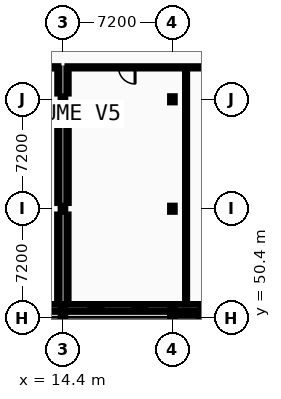
"""IFC4 building model, lengths in metres.
Left out: names, types, materials, properties, quantities, classifications, styles, units other than length and angle.
Written with IfcOpenShell. Run it as: python <this file> out.ifc"""

import sys

from ifc_helpers import new_model, si_unit, direction, frame, frame_2d, origin, origin_2d, place, context, subcontext, project, spatial, rectangle, i_section, extrude, element, fill, save


model = new_model("IFC4")
c1 = context("Model", 3, precision=1e-05, world=origin(), true_north=direction((0.0, 1.0)))
c2 = subcontext(c1, "Body", "Model", "MODEL_VIEW")
j1 = project(units=[si_unit("LENGTHUNIT", "METRE"), si_unit("PLANEANGLEUNIT", "RADIAN")], contexts=[c1])
p1 = place(None, origin())
s1 = spatial("IfcSite", under=j1, at=p1, CompositionType="ELEMENT")
p2 = place(p1, origin())
s2 = spatial("IfcBuilding", under=s1, at=p2, CompositionType="ELEMENT")
p3 = place(p2, origin())
s3 = spatial("IfcBuildingStorey", under=s2, at=p3, CompositionType="ELEMENT", Elevation=0.0)
p4 = place(p3, frame((14.4, 50.4, 0.0), z_axis=(0.0, 0.0, 1.0), x_axis=(1.0, 0.0, 0.0)))
e1 = element("IfcColumn", 1, at=p4, inside=s3, PredefinedType="COLUMN", context=c2, shape_type="SweptSolid", body=[
    extrude(i_section(OverallWidth=0.3, OverallDepth=0.45, WebThickness=0.014, FlangeThickness=0.026, FilletRadius=0.027, at=origin_2d()), origin(), (0.0, 0.0, 1.0), 5.2),
])
p5 = place(p3, frame((14.4, 51.12, 0.0), z_axis=(0.0, 0.0, 1.0), x_axis=(1.0, 0.0, 0.0)))
e2 = element("IfcColumn", 2, at=p5, inside=s3, PredefinedType="COLUMN", context=c2, shape_type="SweptSolid", body=[
    extrude(i_section(OverallWidth=0.3, OverallDepth=0.36, WebThickness=0.012, FlangeThickness=0.022, FilletRadius=0.027, at=origin_2d()), origin(), (0.0, 0.0, 1.0), 5.2),
])
for number, where, z_axis, x_axis in (
    (3, (14.4, 57.6, 0.0), (0.0, 0.0, 1.0), (1.0, 0.0, 0.0)),
    (4, (14.4, 64.8, 0.0), (0.0, 0.0, 1.0), (1.0, 0.0, 0.0)),
):
    element("IfcColumn", number, at=place(p3, frame(where, z_axis=z_axis, x_axis=x_axis)), inside=s3, PredefinedType="COLUMN", context=c2, shape_type="SweptSolid", body=[
        extrude(i_section(OverallWidth=0.3, OverallDepth=0.4, WebThickness=0.013, FlangeThickness=0.024, FilletRadius=0.027, at=origin_2d()), origin(), (0.0, 0.0, 1.0), 5.2),
    ])
p6 = place(p3, frame((21.6, 50.4, 0.0), z_axis=(0.0, 0.0, 1.0), x_axis=(1.0, 0.0, 0.0)))
e5 = element("IfcColumn", 5, at=p6, inside=s3, PredefinedType="COLUMN", context=c2, shape_type="SweptSolid", body=[
    extrude(i_section(OverallWidth=0.3, OverallDepth=0.45, WebThickness=0.014, FlangeThickness=0.026, FilletRadius=0.027, at=origin_2d()), origin(), (0.0, 0.0, 1.0), 5.2),
])
p7 = place(p3, frame((21.6, 51.12, 0.0), z_axis=(0.0, 0.0, 1.0), x_axis=(1.0, 0.0, 0.0)))
e6 = element("IfcColumn", 6, at=p7, inside=s3, PredefinedType="COLUMN", context=c2, shape_type="SweptSolid", body=[
    extrude(i_section(OverallWidth=0.3, OverallDepth=0.36, WebThickness=0.012, FlangeThickness=0.022, FilletRadius=0.027, at=origin_2d()), origin(), (0.0, 0.0, 1.0), 5.2),
])
for number, where, z_axis, x_axis in (
    (7, (21.6, 57.6, 0.0), (0.0, 0.0, 1.0), (1.0, 0.0, 0.0)),
    (8, (21.6, 64.8, 0.0), (0.0, 0.0, 1.0), (1.0, 0.0, 0.0)),
):
    element("IfcColumn", number, at=place(p3, frame(where, z_axis=z_axis, x_axis=x_axis)), inside=s3, PredefinedType="COLUMN", context=c2, shape_type="SweptSolid", body=[
        extrude(i_section(OverallWidth=0.3, OverallDepth=0.4, WebThickness=0.013, FlangeThickness=0.024, FilletRadius=0.027, at=origin_2d()), origin(), (0.0, 0.0, 1.0), 5.2),
    ])
p8 = place(p3, frame((28.8, 50.4, 0.0), z_axis=(0.0, 0.0, 1.0), x_axis=(-1.0, 0.0, 0.0)))
e9 = element("IfcWall", 9, at=p8, inside=s3, PredefinedType="STANDARD", context=c2, shape_type="SweptSolid", body=[
    extrude(rectangle(XDim=7.31, YDim=0.42, at=frame_2d((3.655, 0.0))), origin(), (0.0, 0.0, 1.0), 4.665),
])
p9 = place(p8, frame((1.743, 0.0, 1.1)))
e10 = element("IfcOpeningElement", 10, at=p9, cuts=e9, PredefinedType="OPENING", context=c2, shape_type="SweptSolid", body=[
    extrude(rectangle(XDim=0.9, YDim=1.6, at=frame_2d((0.45, 0.8))), frame((0.0, 0.22, 0.0), z_axis=(0.0, -1.0, 0.0), x_axis=(1.0, 0.0, 0.0)), (0.0, 0.0, 1.0), 0.44),
])
p10 = place(p8, frame((4.667, 0.0, 1.1)))
e11 = element("IfcOpeningElement", 11, at=p10, cuts=e9, PredefinedType="OPENING", context=c2, shape_type="SweptSolid", body=[
    extrude(rectangle(XDim=0.9, YDim=1.6, at=frame_2d((0.45, 0.8))), frame((0.0, 0.22, 0.0), z_axis=(0.0, -1.0, 0.0), x_axis=(1.0, 0.0, 0.0)), (0.0, 0.0, 1.0), 0.44),
])
p11 = place(p3, frame((7.2, 51.12, 0.0), z_axis=(0.0, 0.0, 1.0), x_axis=(1.0, 0.0, 0.0)))
e12 = element("IfcWall", 12, at=p11, inside=s3, PredefinedType="STANDARD", context=c2, shape_type="SweptSolid", body=[
    extrude(rectangle(XDim=7.2, YDim=0.42, at=frame_2d((3.6, 0.0))), origin(), (0.0, 0.0, 1.0), 4.635),
])
p12 = place(p11, frame((4.576, 0.0, 0.95)))
e13 = element("IfcOpeningElement", 13, at=p12, cuts=e12, PredefinedType="OPENING", context=c2, shape_type="SweptSolid", body=[
    extrude(rectangle(XDim=0.928, YDim=1.404, at=frame_2d((0.464, 0.702))), frame((0.0, 0.22, 0.0), z_axis=(0.0, -1.0, 0.0), x_axis=(1.0, 0.0, 0.0)), (0.0, 0.0, 1.0), 0.44),
])
p13 = place(p3, frame((14.4, 51.12, 0.0), z_axis=(0.0, 0.0, 1.0), x_axis=(1.0, 0.0, 0.0)))
e14 = element("IfcWall", 14, at=p13, inside=s3, PredefinedType="STANDARD", context=c2, shape_type="SweptSolid", body=[
    extrude(rectangle(XDim=7.2, YDim=0.42, at=frame_2d((3.6, 0.0))), origin(), (0.0, 0.0, 1.0), 4.635),
])
p14 = place(p13, frame((1.679, 0.0, 0.95)))
e15 = element("IfcOpeningElement", 15, at=p14, cuts=e14, PredefinedType="OPENING", context=c2, shape_type="SweptSolid", body=[
    extrude(rectangle(XDim=0.962, YDim=1.404, at=frame_2d((0.481, 0.702))), frame((0.0, 0.22, 0.0), z_axis=(0.0, -1.0, 0.0), x_axis=(1.0, 0.0, 0.0)), (0.0, 0.0, 1.0), 0.44),
])
p15 = place(p13, frame((4.559, 0.0, 0.95)))
e16 = element("IfcOpeningElement", 16, at=p15, cuts=e14, PredefinedType="OPENING", context=c2, shape_type="SweptSolid", body=[
    extrude(rectangle(XDim=0.962, YDim=1.404, at=frame_2d((0.481, 0.702))), frame((0.0, 0.22, 0.0), z_axis=(0.0, -1.0, 0.0), x_axis=(1.0, 0.0, 0.0)), (0.0, 0.0, 1.0), 0.44),
])
p16 = place(p3, frame((21.6, 51.12, 0.0), z_axis=(0.0, 0.0, 1.0), x_axis=(1.0, 0.0, 0.0)))
e17 = element("IfcWall", 17, at=p16, inside=s3, PredefinedType="STANDARD", context=c2, shape_type="SweptSolid", body=[
    extrude(rectangle(XDim=7.41, YDim=0.42, at=frame_2d((3.705, 0.0))), origin(), (0.0, 0.0, 1.0), 4.635),
])
p17 = place(p16, frame((1.725, 0.0, 0.95)))
e18 = element("IfcOpeningElement", 18, at=p17, cuts=e17, PredefinedType="OPENING", context=c2, shape_type="SweptSolid", body=[
    extrude(rectangle(XDim=0.996, YDim=1.404, at=frame_2d((0.498, 0.702))), frame((0.0, 0.22, 0.0), z_axis=(0.0, -1.0, 0.0), x_axis=(1.0, 0.0, 0.0)), (0.0, 0.0, 1.0), 0.44),
])
p18 = place(p16, frame((4.689, 0.0, 0.95)))
e19 = element("IfcOpeningElement", 19, at=p18, cuts=e17, PredefinedType="OPENING", context=c2, shape_type="SweptSolid", body=[
    extrude(rectangle(XDim=0.996, YDim=1.404, at=frame_2d((0.498, 0.702))), frame((0.0, 0.22, 0.0), z_axis=(0.0, -1.0, 0.0), x_axis=(1.0, 0.0, 0.0)), (0.0, 0.0, 1.0), 0.44),
])
p19 = place(p3, frame((10.65, 66.9, 0.0), z_axis=(0.0, 0.0, 1.0), x_axis=(1.0, 0.0, 0.0)))
e20 = element("IfcWall", 20, at=p19, inside=s3, PredefinedType="PARTITIONING", context=c2, shape_type="SweptSolid", body=[
    extrude(rectangle(XDim=3.45, YDim=0.15, at=frame_2d((1.725, 0.0))), origin(), (0.0, 0.0, 1.0), 4.94),
])
p20 = place(p19, frame((0.45, 0.0, 0.0)))
e21 = element("IfcOpeningElement", 21, at=p20, cuts=e20, PredefinedType="OPENING", context=c2, shape_type="SweptSolid", body=[
    extrude(rectangle(XDim=1.01, YDim=2.096, at=frame_2d((0.505, 1.048))), frame((0.0, 0.085, 0.0), z_axis=(0.0, -1.0, 0.0), x_axis=(1.0, 0.0, 0.0)), (0.0, 0.0, 1.0), 0.17),
])
p21 = place(p3, frame((14.7, 66.9, 0.0), z_axis=(0.0, 0.0, 1.0), x_axis=(1.0, 0.0, 0.0)))
e22 = element("IfcWall", 22, at=p21, inside=s3, PredefinedType="PARTITIONING", context=c2, shape_type="SweptSolid", body=[
    extrude(rectangle(XDim=13.9, YDim=0.142, at=frame_2d((6.95, 0.0))), origin(), (0.0, 0.0, 1.0), 4.94),
])
p22 = place(p21, frame((10.319, 0.0, 0.0)))
e23 = element("IfcOpeningElement", 23, at=p22, cuts=e22, PredefinedType="OPENING", context=c2, shape_type="SweptSolid", body=[
    extrude(rectangle(XDim=1.062, YDim=2.096, at=frame_2d((0.531, 1.048))), frame((0.0, 0.081, 0.0), z_axis=(0.0, -1.0, 0.0), x_axis=(1.0, 0.0, 0.0)), (0.0, 0.0, 1.0), 0.162),
])
p23 = place(p21, frame((3.356, 0.0, 0.0)))
e24 = element("IfcOpeningElement", 24, at=p23, cuts=e22, PredefinedType="OPENING", context=c2, shape_type="SweptSolid", body=[
    extrude(rectangle(XDim=1.088, YDim=2.096, at=frame_2d((0.544, 1.048))), frame((0.0, 0.081, 0.0), z_axis=(0.0, -1.0, 0.0), x_axis=(1.0, 0.0, 0.0)), (0.0, 0.0, 1.0), 0.162),
])
p24 = place(p3, frame((14.1, 51.5, 0.0), z_axis=(0.0, 0.0, 1.0), x_axis=(0.0, 1.0, 0.0)))
e25 = element("IfcWall", 25, at=p24, inside=s3, PredefinedType="PARTITIONING", context=c2, shape_type="SweptSolid", body=[
    extrude(rectangle(XDim=5.72, YDim=0.16, at=frame_2d((2.86, 0.0))), origin(), (0.0, 0.0, 1.0), 4.635),
])
p25 = place(p3, frame((14.1, 57.98, 0.0), z_axis=(0.0, 0.0, 1.0), x_axis=(0.0, 1.0, 0.0)))
e26 = element("IfcWall", 26, at=p25, inside=s3, PredefinedType="PARTITIONING", context=c2, shape_type="SweptSolid", body=[
    extrude(rectangle(XDim=6.44, YDim=0.15, at=frame_2d((3.22, 0.0))), origin(), (0.0, 0.0, 1.0), 4.635),
])
p26 = place(p3, frame((14.1, 65.18, 0.0), z_axis=(0.0, 0.0, 1.0), x_axis=(0.0, 1.0, 0.0)))
e27 = element("IfcWall", 27, at=p26, inside=s3, PredefinedType="PARTITIONING", context=c2, shape_type="SweptSolid", body=[
    extrude(rectangle(XDim=1.645, YDim=0.142, at=frame_2d((0.823, 0.0))), origin(), (0.0, 0.0, 1.0), 4.635),
])
p27 = place(p3, frame((14.7, 51.5, 0.0), z_axis=(0.0, 0.0, 1.0), x_axis=(0.0, 1.0, 0.0)))
e28 = element("IfcWall", 28, at=p27, inside=s3, PredefinedType="PARTITIONING", context=c2, shape_type="SweptSolid", body=[
    extrude(rectangle(XDim=5.72, YDim=0.135, at=frame_2d((2.86, 0.0))), origin(), (0.0, 0.0, 1.0), 4.94),
])
p28 = place(p3, frame((14.7, 57.98, 0.0), z_axis=(0.0, 0.0, 1.0), x_axis=(0.0, 1.0, 0.0)))
e29 = element("IfcWall", 29, at=p28, inside=s3, PredefinedType="PARTITIONING", context=c2, shape_type="SweptSolid", body=[
    extrude(rectangle(XDim=6.44, YDim=0.16, at=frame_2d((3.22, 0.0))), origin(), (0.0, 0.0, 1.0), 4.635),
])
p29 = place(p3, frame((14.7, 65.18, 0.0), z_axis=(0.0, 0.0, 1.0), x_axis=(0.0, 1.0, 0.0)))
e30 = element("IfcWall", 30, at=p29, inside=s3, PredefinedType="PARTITIONING", context=c2, shape_type="SweptSolid", body=[
    extrude(rectangle(XDim=1.649, YDim=0.15, at=frame_2d((0.825, 0.0))), origin(), (0.0, 0.0, 1.0), 4.635),
])
p30 = place(p3, frame((22.5, 51.32, 0.0), z_axis=(0.0, 0.0, 1.0), x_axis=(0.0, 1.0, 0.0)))
e31 = element("IfcWall", 31, at=p30, inside=s3, PredefinedType="PARTITIONING", context=c2, shape_type="SweptSolid", body=[
    extrude(rectangle(XDim=15.509, YDim=0.135, at=frame_2d((7.754, 0.0))), origin(), (0.0, 0.0, 1.0), 4.94),
])
p31 = place(p10, origin())
e32 = element("IfcWindow", 32, at=p31, inside=s3, PartitioningType="SINGLE_PANEL", PredefinedType="WINDOW", context=c2, shape_type="SweptSolid", body=[
    extrude(rectangle(XDim=0.9, YDim=1.6, at=frame_2d((0.45, 0.8))), frame((0.0, 0.03, 0.0), z_axis=(0.0, -1.0, 0.0), x_axis=(1.0, 0.0, 0.0)), (0.0, 0.0, 1.0), 0.06),
])
fill(e11, e32)
p32 = place(p14, origin())
e33 = element("IfcWindow", 33, at=p32, inside=s3, PartitioningType="SINGLE_PANEL", PredefinedType="WINDOW", context=c2, shape_type="SweptSolid", body=[
    extrude(rectangle(XDim=0.962, YDim=1.404, at=frame_2d((0.481, 0.702))), frame((0.0, 0.03, 0.0), z_axis=(0.0, -1.0, 0.0), x_axis=(1.0, 0.0, 0.0)), (0.0, 0.0, 1.0), 0.06),
])
fill(e15, e33)
p33 = place(p15, origin())
e34 = element("IfcWindow", 34, at=p33, inside=s3, PartitioningType="SINGLE_PANEL", PredefinedType="WINDOW", context=c2, shape_type="SweptSolid", body=[
    extrude(rectangle(XDim=0.962, YDim=1.404, at=frame_2d((0.481, 0.702))), frame((0.0, 0.03, 0.0), z_axis=(0.0, -1.0, 0.0), x_axis=(1.0, 0.0, 0.0)), (0.0, 0.0, 1.0), 0.06),
])
fill(e16, e34)
p34 = place(p17, origin())
e35 = element("IfcWindow", 35, at=p34, inside=s3, PartitioningType="SINGLE_PANEL", PredefinedType="WINDOW", context=c2, shape_type="SweptSolid", body=[
    extrude(rectangle(XDim=0.996, YDim=1.404, at=frame_2d((0.498, 0.702))), frame((0.0, 0.03, 0.0), z_axis=(0.0, -1.0, 0.0), x_axis=(1.0, 0.0, 0.0)), (0.0, 0.0, 1.0), 0.06),
])
fill(e18, e35)
p35 = place(p23, origin())
e36 = element("IfcDoor", 36, at=p35, inside=s3, OperationType="SINGLE_SWING_RIGHT", PredefinedType="DOOR", context=c2, shape_type="SweptSolid", body=[
    extrude(rectangle(XDim=1.088, YDim=2.096, at=frame_2d((0.544, 1.048))), frame((0.0, 0.025, 0.0), z_axis=(0.0, -1.0, 0.0), x_axis=(1.0, 0.0, 0.0)), (0.0, 0.0, 1.0), 0.05),
])
fill(e24, e36)
save(model, sys.argv[1])
